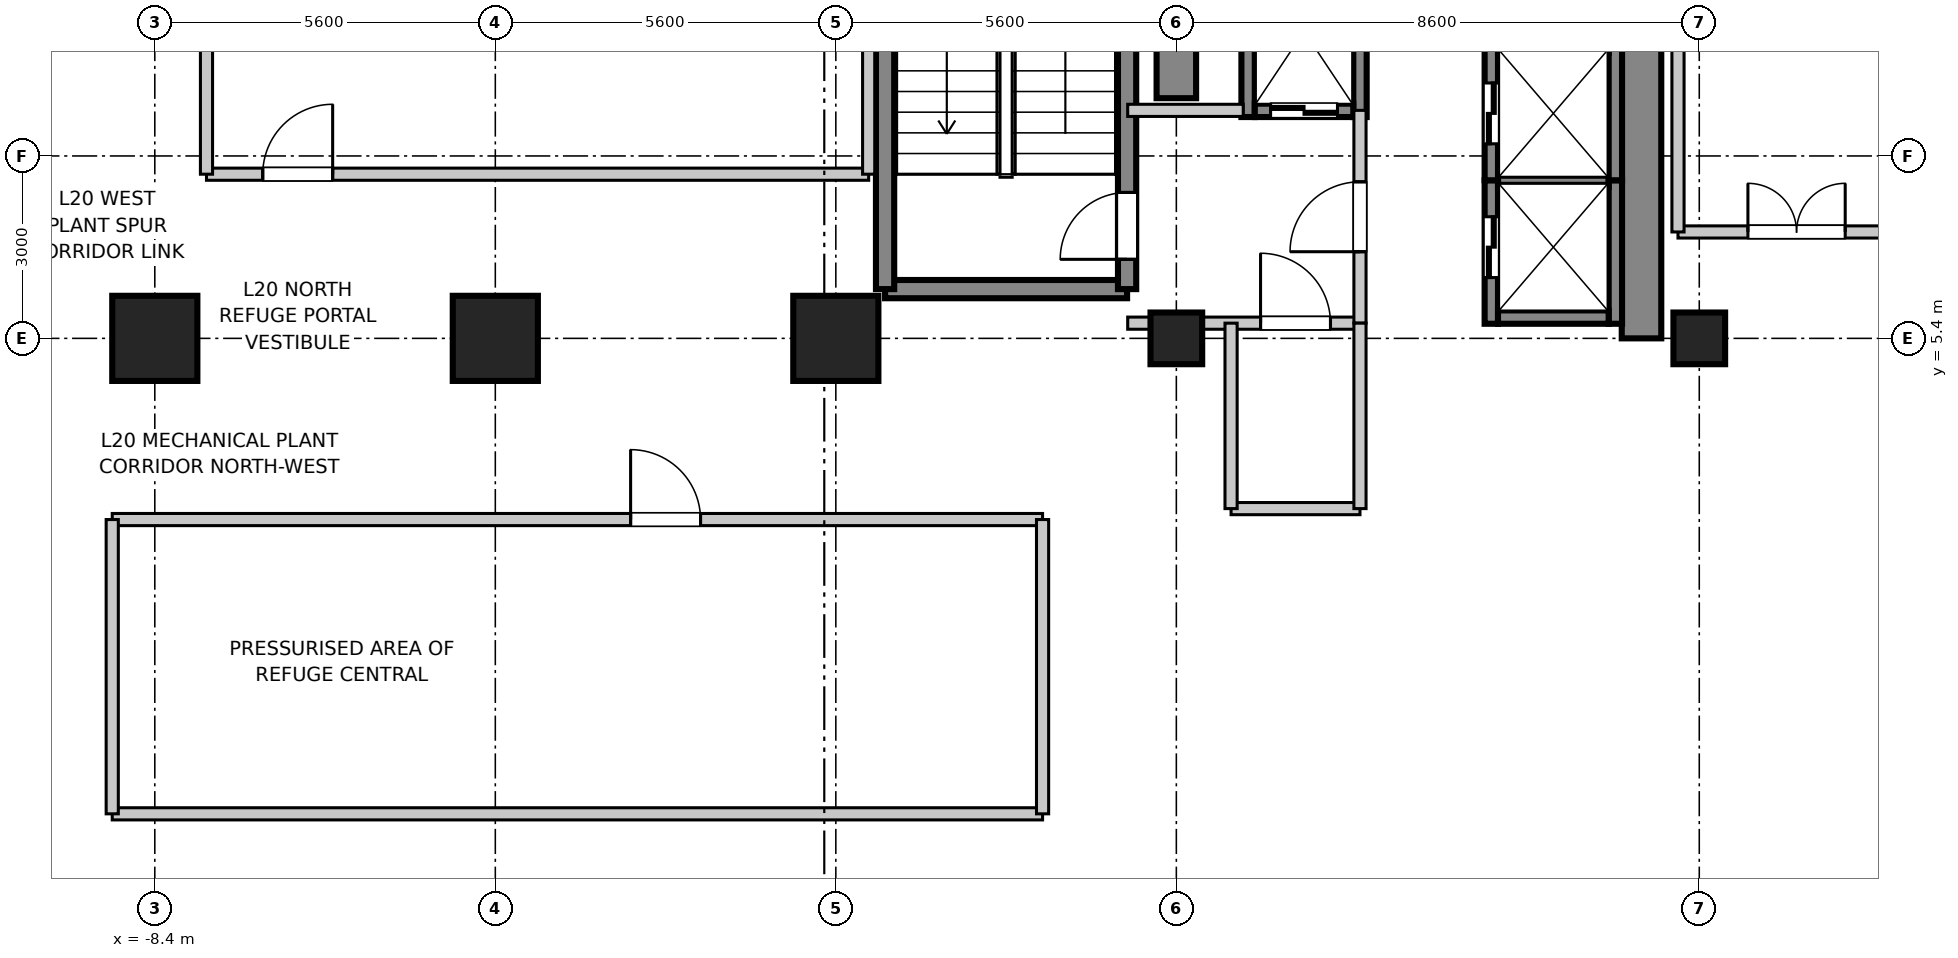
"""IFC4 building model, lengths in metres.
Left out: names, types, materials, properties, quantities, classifications, styles, units other than length and angle.
Written with IfcOpenShell. Run it as: python <this file> out.ifc"""

import sys

from ifc_helpers import new_model, si_unit, direction, frame, frame_2d, origin, origin_2d, place, context, subcontext, project, spatial, rectangle, extrude, source, transform, mapped, element, fill, save


model = new_model("IFC4")
c1 = context("Model", 3, precision=1e-05, world=origin(), true_north=direction((0.0, 1.0)))
c2 = subcontext(c1, "Body", "Model", "MODEL_VIEW")
j1 = project(units=[si_unit("LENGTHUNIT", "METRE"), si_unit("PLANEANGLEUNIT", "RADIAN")], contexts=[c1])
p1 = place(None, origin())
s1 = spatial("IfcSite", under=j1, at=p1, CompositionType="ELEMENT")
p2 = place(p1, origin())
s2 = spatial("IfcBuilding", under=s1, at=p2, CompositionType="ELEMENT")
p3 = place(p2, frame((0.0, 0.0, 83.5)))
s3 = spatial("IfcBuildingStorey", under=s2, at=p3, CompositionType="ELEMENT", Elevation=83.5)
m1 = source(origin(), c2, "Body", "SweptSolid", [
    extrude(rectangle(XDim=1.4, YDim=1.4, at=origin_2d()), origin(), (0.0, 0.0, 1.0), 4.755),
])
for number, where, z_axis, x_axis in (
    (1, (-8.4, 5.4, 0.0), (0.0, 0.0, 1.0), (1.0, 0.0, 0.0)),
    (2, (-2.8, 5.4, 0.0), (0.0, 0.0, 1.0), (1.0, 0.0, 0.0)),
    (3, (2.8, 5.4, 0.0), (0.0, 0.0, 1.0), (1.0, 0.0, 0.0)),
):
    element("IfcColumn", number, at=place(p3, frame(where, z_axis=z_axis, x_axis=x_axis)), inside=s3, PredefinedType="COLUMN", context=c2, shape_type="MappedRepresentation", body=[
        mapped(m1, transform((0.0, 0.0, 0.0), scale=1.0)),
    ])
m2 = source(origin(), c2, "Body", "SweptSolid", [
    extrude(rectangle(XDim=0.85, YDim=0.85, at=origin_2d()), origin(), (0.0, 0.0, 1.0), 4.755),
])
for number, where, z_axis, x_axis in (
    (4, (8.4, 5.4, 0.0), (0.0, 0.0, 1.0), (1.0, 0.0, 0.0)),
    (5, (17.0, 5.4, 0.0), (0.0, 0.0, 1.0), (1.0, 0.0, 0.0)),
):
    element("IfcColumn", number, at=place(p3, frame(where, z_axis=z_axis, x_axis=x_axis)), inside=s3, PredefinedType="PILASTER", context=c2, shape_type="MappedRepresentation", body=[
        mapped(m2, transform((0.0, 0.0, 0.0), scale=1.0)),
    ])
m3 = source(origin(), c2, "Body", "SweptSolid", [
    extrude(rectangle(XDim=7.65, YDim=0.65, at=frame_2d((3.825, 0.0))), origin(), (0.0, 0.0, 1.0), 4.53),
])
p4 = place(p3, frame((8.4, 9.35, 0.0), z_axis=(0.0, 0.0, 1.0), x_axis=(0.0, 1.0, 0.0)))
e6 = element("IfcWall", 6, at=p4, inside=s3, PredefinedType="SHEAR", context=c2, shape_type="MappedRepresentation", body=[
    mapped(m3, transform((0.0, 0.0, 0.0), scale=1.0)),
])
m4 = source(origin(), c2, "Body", "SweptSolid", [
    extrude(rectangle(XDim=11.6, YDim=0.65, at=frame_2d((5.8, 0.0))), origin(), (0.0, 0.0, 1.0), 4.53),
])
p5 = place(p3, frame((16.05, 5.4, 0.0), z_axis=(0.0, 0.0, 1.0), x_axis=(0.0, 1.0, 0.0)))
e7 = element("IfcWall", 7, at=p5, inside=s3, PredefinedType="SHEAR", context=c2, shape_type="MappedRepresentation", body=[
    mapped(m4, transform((0.0, 0.0, 0.0), scale=1.0)),
])
m5 = source(origin(), c2, "Body", "SweptSolid", [
    extrude(rectangle(XDim=3.98, YDim=0.3, at=frame_2d((1.99, 0.0))), origin(), (0.0, 0.0, 1.0), 4.53),
])
p6 = place(p3, frame((3.61, 6.21, 0.0), z_axis=(0.0, 0.0, 1.0), x_axis=(1.0, 0.0, 0.0)))
e8 = element("IfcWall", 8, at=p6, inside=s3, PredefinedType="SHEAR", context=c2, shape_type="MappedRepresentation", body=[
    mapped(m5, transform((0.0, 0.0, 0.0), scale=1.0)),
])
m6 = source(origin(), c2, "Body", "SweptSolid", [
    extrude(rectangle(XDim=9.38, YDim=0.3, at=frame_2d((4.69, 0.0))), origin(), (0.0, 0.0, 1.0), 4.53),
])
p7 = place(p3, frame((3.61, 6.21, 0.0), z_axis=(0.0, 0.0, 1.0), x_axis=(0.0, 1.0, 0.0)))
e9 = element("IfcWall", 9, at=p7, inside=s3, PredefinedType="SHEAR", context=c2, shape_type="MappedRepresentation", body=[
    mapped(m6, transform((0.0, 0.0, 0.0), scale=1.0)),
])
p8 = place(p3, frame((7.59, 6.21, 0.0), z_axis=(0.0, 0.0, 1.0), x_axis=(0.0, 1.0, 0.0)))
e10 = element("IfcWall", 10, at=p8, inside=s3, PredefinedType="SHEAR", context=c2, shape_type="MappedRepresentation", body=[
    mapped(m6, transform((0.0, 0.0, 0.0), scale=1.0)),
])
p9 = place(p8, frame((0.49, 0.0, 0.0)))
e11 = element("IfcOpeningElement", 11, at=p9, cuts=e10, PredefinedType="OPENING", context=c2, shape_type="SweptSolid", body=[
    extrude(rectangle(XDim=1.1, YDim=2.15, at=frame_2d((0.55, 1.075))), frame((0.0, 0.16, 0.0), z_axis=(0.0, -1.0, 0.0), x_axis=(1.0, 0.0, 0.0)), (0.0, 0.0, 1.0), 0.32),
])
m7 = source(origin(), c2, "Body", "SweptSolid", [
    extrude(rectangle(XDim=2.36, YDim=0.22, at=frame_2d((1.18, 0.0))), origin(), (0.0, 0.0, 1.0), 4.53),
])
p10 = place(p3, frame((13.58, 5.64, 0.0), z_axis=(0.0, 0.0, 1.0), x_axis=(0.0, 1.0, 0.0)))
e12 = element("IfcWall", 12, at=p10, inside=s3, PredefinedType="SHEAR", context=c2, shape_type="MappedRepresentation", body=[
    mapped(m7, transform((0.0, 0.0, 0.0), scale=1.0)),
])
p11 = place(p10, frame((0.76, 0.0, 0.0)))
e13 = element("IfcOpeningElement", 13, at=p11, cuts=e12, PredefinedType="OPENING", context=c2, shape_type="SweptSolid", body=[
    extrude(rectangle(XDim=1.0, YDim=2.2, at=frame_2d((0.5, 1.1))), frame((0.0, 0.12, 0.0), z_axis=(0.0, -1.0, 0.0), x_axis=(1.0, 0.0, 0.0)), (0.0, 0.0, 1.0), 0.24),
])
p12 = place(p3, frame((15.62, 5.64, 0.0), z_axis=(0.0, 0.0, 1.0), x_axis=(0.0, 1.0, 0.0)))
e14 = element("IfcWall", 14, at=p12, inside=s3, PredefinedType="SHEAR", context=c2, shape_type="MappedRepresentation", body=[
    mapped(m7, transform((0.0, 0.0, 0.0), scale=1.0)),
])
m8 = source(origin(), c2, "Body", "SweptSolid", [
    extrude(rectangle(XDim=1.82, YDim=0.22, at=frame_2d((0.91, 0.0))), origin(), (0.0, 0.0, 1.0), 4.53),
])
p13 = place(p3, frame((13.69, 5.75, 0.0), z_axis=(0.0, 0.0, 1.0), x_axis=(1.0, 0.0, 0.0)))
e15 = element("IfcWall", 15, at=p13, inside=s3, PredefinedType="SHEAR", context=c2, shape_type="MappedRepresentation", body=[
    mapped(m8, transform((0.0, 0.0, 0.0), scale=1.0)),
])
m9 = source(origin(), c2, "Body", "SweptSolid", [
    extrude(rectangle(XDim=1.82, YDim=0.22, at=frame_2d((0.91, 0.0))), origin(), (0.0, 0.0, 1.0), 4.8),
])
p14 = place(p3, frame((13.69, 8.0, 0.0), z_axis=(0.0, 0.0, 1.0), x_axis=(1.0, 0.0, 0.0)))
e16 = element("IfcWall", 16, at=p14, inside=s3, PredefinedType="SHEAR", context=c2, shape_type="MappedRepresentation", body=[
    mapped(m9, transform((0.0, 0.0, 0.0), scale=1.0)),
])
m10 = source(origin(), c2, "Body", "SweptSolid", [
    extrude(rectangle(XDim=2.2, YDim=0.22, at=frame_2d((1.1, 0.0))), origin(), (0.0, 0.0, 1.0), 4.53),
])
p15 = place(p3, frame((13.58, 8.0, 0.0), z_axis=(0.0, 0.0, 1.0), x_axis=(0.0, 1.0, 0.0)))
e17 = element("IfcWall", 17, at=p15, inside=s3, PredefinedType="SHEAR", context=c2, shape_type="MappedRepresentation", body=[
    mapped(m10, transform((0.0, 0.0, 0.0), scale=1.0)),
])
p16 = place(p15, frame((0.6, 0.0, 0.0)))
e18 = element("IfcOpeningElement", 18, at=p16, cuts=e17, PredefinedType="OPENING", context=c2, shape_type="SweptSolid", body=[
    extrude(rectangle(XDim=1.0, YDim=2.2, at=frame_2d((0.5, 1.1))), frame((0.0, 0.12, 0.0), z_axis=(0.0, -1.0, 0.0), x_axis=(1.0, 0.0, 0.0)), (0.0, 0.0, 1.0), 0.24),
])
p17 = place(p3, frame((15.62, 8.0, 0.0), z_axis=(0.0, 0.0, 1.0), x_axis=(0.0, 1.0, 0.0)))
e19 = element("IfcWall", 19, at=p17, inside=s3, PredefinedType="SHEAR", context=c2, shape_type="MappedRepresentation", body=[
    mapped(m10, transform((0.0, 0.0, 0.0), scale=1.0)),
])
p18 = place(p3, frame((13.69, 10.2, 0.0), z_axis=(0.0, 0.0, 1.0), x_axis=(1.0, 0.0, 0.0)))
e20 = element("IfcWall", 20, at=p18, inside=s3, PredefinedType="SHEAR", context=c2, shape_type="MappedRepresentation", body=[
    mapped(m9, transform((0.0, 0.0, 0.0), scale=1.0)),
])
m11 = source(origin(), c2, "Body", "SweptSolid", [
    extrude(rectangle(XDim=2.82, YDim=0.22, at=frame_2d((1.41, 0.0))), origin(), (0.0, 0.0, 1.0), 4.53),
])
for number, where, z_axis, x_axis in (
    (21, (9.58, 9.04, 0.0), (0.0, 0.0, 1.0), (0.0, 1.0, 0.0)),
    (22, (11.42, 9.04, 0.0), (0.0, 0.0, 1.0), (0.0, 1.0, 0.0)),
):
    element("IfcWall", number, at=place(p3, frame(where, z_axis=z_axis, x_axis=x_axis)), inside=s3, PredefinedType="SHEAR", context=c2, shape_type="MappedRepresentation", body=[
        mapped(m11, transform((0.0, 0.0, 0.0), scale=1.0)),
    ])
m12 = source(origin(), c2, "Body", "SweptSolid", [
    extrude(rectangle(XDim=1.62, YDim=0.22, at=frame_2d((0.81, 0.0))), origin(), (0.0, 0.0, 1.0), 4.53),
])
p19 = place(p3, frame((9.69, 9.15, 0.0), z_axis=(0.0, 0.0, 1.0), x_axis=(1.0, 0.0, 0.0)))
e23 = element("IfcWall", 23, at=p19, inside=s3, PredefinedType="SHEAR", context=c2, shape_type="MappedRepresentation", body=[
    mapped(m12, transform((0.0, 0.0, 0.0), scale=1.0)),
])
p20 = place(p19, frame((0.26, 0.0, 0.0)))
e24 = element("IfcOpeningElement", 24, at=p20, cuts=e23, PredefinedType="OPENING", context=c2, shape_type="SweptSolid", body=[
    extrude(rectangle(XDim=1.1, YDim=2.2, at=frame_2d((0.55, 1.1))), frame((0.0, 0.12, 0.0), z_axis=(0.0, -1.0, 0.0), x_axis=(1.0, 0.0, 0.0)), (0.0, 0.0, 1.0), 0.24),
])
m13 = source(origin(), c2, "Body", "SweptSolid", [
    extrude(rectangle(XDim=3.82, YDim=0.2, at=frame_2d((1.91, 0.0))), origin(), (0.0, 0.0, 1.0), 3.4),
])
p21 = place(p3, frame((7.6, 5.65, 0.0), z_axis=(0.0, 0.0, 1.0), x_axis=(1.0, 0.0, 0.0)))
e25 = element("IfcWall", 25, at=p21, inside=s3, PredefinedType="PARTITIONING", context=c2, shape_type="MappedRepresentation", body=[
    mapped(m13, transform((0.0, 0.0, 0.0), scale=1.0)),
])
p22 = place(p21, frame((2.185, 0.0, 0.0)))
e26 = element("IfcOpeningElement", 26, at=p22, cuts=e25, PredefinedType="OPENING", context=c2, shape_type="SweptSolid", body=[
    extrude(rectangle(XDim=1.15, YDim=2.15, at=frame_2d((0.575, 1.075))), frame((0.0, 0.11, 0.0), z_axis=(0.0, -1.0, 0.0), x_axis=(1.0, 0.0, 0.0)), (0.0, 0.0, 1.0), 0.22),
])
m14 = source(origin(), c2, "Body", "SweptSolid", [
    extrude(rectangle(XDim=1.9, YDim=0.2, at=frame_2d((0.95, 0.0))), origin(), (0.0, 0.0, 1.0), 3.4),
])
p23 = place(p3, frame((7.6, 9.15, 0.0), z_axis=(0.0, 0.0, 1.0), x_axis=(1.0, 0.0, 0.0)))
e27 = element("IfcWall", 27, at=p23, inside=s3, PredefinedType="PARTITIONING", context=c2, shape_type="MappedRepresentation", body=[
    mapped(m14, transform((0.0, 0.0, 0.0), scale=1.0)),
])
m15 = source(origin(), c2, "Body", "SweptSolid", [
    extrude(rectangle(XDim=3.5, YDim=0.2, at=frame_2d((1.75, 0.0))), origin(), (0.0, 0.0, 1.0), 3.4),
])
p24 = place(p3, frame((11.42, 5.65, 0.0), z_axis=(0.0, 0.0, 1.0), x_axis=(0.0, 1.0, 0.0)))
e28 = element("IfcWall", 28, at=p24, inside=s3, PredefinedType="PARTITIONING", context=c2, shape_type="MappedRepresentation", body=[
    mapped(m15, transform((0.0, 0.0, 0.0), scale=1.0)),
])
p25 = place(p24, frame((1.175, 0.0, 0.0)))
e29 = element("IfcOpeningElement", 29, at=p25, cuts=e28, PredefinedType="OPENING", context=c2, shape_type="SweptSolid", body=[
    extrude(rectangle(XDim=1.15, YDim=2.15, at=frame_2d((0.575, 1.075))), frame((0.0, 0.11, 0.0), z_axis=(0.0, -1.0, 0.0), x_axis=(1.0, 0.0, 0.0)), (0.0, 0.0, 1.0), 0.22),
])
m16 = source(origin(), c2, "Body", "SweptSolid", [
    extrude(rectangle(XDim=2.12, YDim=0.2, at=frame_2d((1.06, 0.0))), origin(), (0.0, 0.0, 1.0), 3.4),
])
p26 = place(p3, frame((9.3, 2.6, 0.0), z_axis=(0.0, 0.0, 1.0), x_axis=(1.0, 0.0, 0.0)))
e30 = element("IfcWall", 30, at=p26, inside=s3, PredefinedType="PARTITIONING", context=c2, shape_type="MappedRepresentation", body=[
    mapped(m16, transform((0.0, 0.0, 0.0), scale=1.0)),
])
m17 = source(origin(), c2, "Body", "SweptSolid", [
    extrude(rectangle(XDim=3.05, YDim=0.2, at=frame_2d((1.525, 0.0))), origin(), (0.0, 0.0, 1.0), 3.4),
])
for number, where, z_axis, x_axis in (
    (31, (9.3, 2.6, 0.0), (0.0, 0.0, 1.0), (0.0, 1.0, 0.0)),
    (32, (11.42, 2.6, 0.0), (0.0, 0.0, 1.0), (0.0, 1.0, 0.0)),
):
    element("IfcWall", number, at=place(p3, frame(where, z_axis=z_axis, x_axis=x_axis)), inside=s3, PredefinedType="PARTITIONING", context=c2, shape_type="MappedRepresentation", body=[
        mapped(m17, transform((0.0, 0.0, 0.0), scale=1.0)),
    ])
m18 = source(origin(), c2, "Body", "SweptSolid", [
    extrude(rectangle(XDim=10.89, YDim=0.2, at=frame_2d((5.445, 0.0))), origin(), (0.0, 0.0, 1.0), 3.4),
])
p27 = place(p3, frame((-7.55, 8.1, 0.0), z_axis=(0.0, 0.0, 1.0), x_axis=(1.0, 0.0, 0.0)))
e33 = element("IfcWall", 33, at=p27, inside=s3, PredefinedType="PARTITIONING", context=c2, shape_type="MappedRepresentation", body=[
    mapped(m18, transform((0.0, 0.0, 0.0), scale=1.0)),
])
p28 = place(p27, frame((0.925, 0.0, 0.0)))
e34 = element("IfcOpeningElement", 34, at=p28, cuts=e33, PredefinedType="OPENING", context=c2, shape_type="SweptSolid", body=[
    extrude(rectangle(XDim=1.15, YDim=2.15, at=frame_2d((0.575, 1.075))), frame((0.0, 0.11, 0.0), z_axis=(0.0, -1.0, 0.0), x_axis=(1.0, 0.0, 0.0)), (0.0, 0.0, 1.0), 0.22),
])
m19 = source(origin(), c2, "Body", "SweptSolid", [
    extrude(rectangle(XDim=8.15, YDim=0.2, at=frame_2d((4.075, 0.0))), origin(), (0.0, 0.0, 1.0), 3.4),
])
for number, where, z_axis, x_axis in (
    (35, (-7.55, 8.1, 0.0), (0.0, 0.0, 1.0), (0.0, 1.0, 0.0)),
    (36, (3.34, 8.1, 0.0), (0.0, 0.0, 1.0), (0.0, 1.0, 0.0)),
):
    element("IfcWall", number, at=place(p3, frame(where, z_axis=z_axis, x_axis=x_axis)), inside=s3, PredefinedType="PARTITIONING", context=c2, shape_type="MappedRepresentation", body=[
        mapped(m19, transform((0.0, 0.0, 0.0), scale=1.0)),
    ])
m20 = source(origin(), c2, "Body", "SweptSolid", [
    extrude(rectangle(XDim=15.3, YDim=0.2, at=frame_2d((7.65, 0.0))), origin(), (0.0, 0.0, 1.0), 3.4),
])
p29 = place(p3, frame((-9.1, -2.42, 0.0), z_axis=(0.0, 0.0, 1.0), x_axis=(1.0, 0.0, 0.0)))
e37 = element("IfcWall", 37, at=p29, inside=s3, PredefinedType="PARTITIONING", context=c2, shape_type="MappedRepresentation", body=[
    mapped(m20, transform((0.0, 0.0, 0.0), scale=1.0)),
])
p30 = place(p3, frame((-9.1, 2.42, 0.0), z_axis=(0.0, 0.0, 1.0), x_axis=(1.0, 0.0, 0.0)))
e38 = element("IfcWall", 38, at=p30, inside=s3, PredefinedType="PARTITIONING", context=c2, shape_type="MappedRepresentation", body=[
    mapped(m20, transform((0.0, 0.0, 0.0), scale=1.0)),
])
p31 = place(p30, frame((8.525, 0.0, 0.0)))
e39 = element("IfcOpeningElement", 39, at=p31, cuts=e38, PredefinedType="OPENING", context=c2, shape_type="SweptSolid", body=[
    extrude(rectangle(XDim=1.15, YDim=2.15, at=frame_2d((0.575, 1.075))), frame((0.0, 0.11, 0.0), z_axis=(0.0, -1.0, 0.0), x_axis=(1.0, 0.0, 0.0)), (0.0, 0.0, 1.0), 0.22),
])
m21 = source(origin(), c2, "Body", "SweptSolid", [
    extrude(rectangle(XDim=4.84, YDim=0.2, at=frame_2d((2.42, 0.0))), origin(), (0.0, 0.0, 1.0), 3.4),
])
for number, where, z_axis, x_axis in (
    (40, (-9.1, -2.42, 0.0), (0.0, 0.0, 1.0), (0.0, 1.0, 0.0)),
    (41, (6.2, -2.42, 0.0), (0.0, 0.0, 1.0), (0.0, 1.0, 0.0)),
):
    element("IfcWall", number, at=place(p3, frame(where, z_axis=z_axis, x_axis=x_axis)), inside=s3, PredefinedType="PARTITIONING", context=c2, shape_type="MappedRepresentation", body=[
        mapped(m21, transform((0.0, 0.0, 0.0), scale=1.0)),
    ])
m22 = source(origin(), c2, "Body", "SweptSolid", [
    extrude(rectangle(XDim=7.47, YDim=0.2, at=frame_2d((3.735, 0.0))), origin(), (0.0, 0.0, 1.0), 3.4),
])
p32 = place(p3, frame((16.65, 7.15, 0.0), z_axis=(0.0, 0.0, 1.0), x_axis=(1.0, 0.0, 0.0)))
e42 = element("IfcWall", 42, at=p32, inside=s3, PredefinedType="PARTITIONING", context=c2, shape_type="MappedRepresentation", body=[
    mapped(m22, transform((0.0, 0.0, 0.0), scale=1.0)),
])
p33 = place(p32, frame((1.15, 0.0, 0.0)))
e43 = element("IfcOpeningElement", 43, at=p33, cuts=e42, PredefinedType="OPENING", context=c2, shape_type="SweptSolid", body=[
    extrude(rectangle(XDim=1.6, YDim=2.15, at=frame_2d((0.8, 1.075))), frame((0.0, 0.11, 0.0), z_axis=(0.0, -1.0, 0.0), x_axis=(1.0, 0.0, 0.0)), (0.0, 0.0, 1.0), 0.22),
])
m23 = source(origin(), c2, "Body", "SweptSolid", [
    extrude(rectangle(XDim=8.9, YDim=0.2, at=frame_2d((4.45, 0.0))), origin(), (0.0, 0.0, 1.0), 3.4),
])
p34 = place(p3, frame((16.65, 7.15, 0.0), z_axis=(0.0, 0.0, 1.0), x_axis=(0.0, 1.0, 0.0)))
e44 = element("IfcWall", 44, at=p34, inside=s3, PredefinedType="PARTITIONING", context=c2, shape_type="MappedRepresentation", body=[
    mapped(m23, transform((0.0, 0.0, 0.0), scale=1.0)),
])
m24 = source(origin(), c2, "Body", "SweptSolid", [
    extrude(rectangle(XDim=1.1, YDim=2.15, at=frame_2d((0.55, 1.075))), frame((0.0, 0.025, 0.0), z_axis=(0.0, -1.0, 0.0), x_axis=(1.0, 0.0, 0.0)), (0.0, 0.0, 1.0), 0.05),
])
p35 = place(p9, origin())
e45 = element("IfcDoor", 45, at=p35, inside=s3, OperationType="SINGLE_SWING_LEFT", PredefinedType="DOOR", context=c2, shape_type="MappedRepresentation", body=[
    mapped(m24, transform((0.0, 0.0, 0.0), scale=1.0)),
])
fill(e11, e45)
m25 = source(origin(), c2, "Body", "SweptSolid", [
    extrude(rectangle(XDim=1.0, YDim=2.2, at=frame_2d((0.5, 1.1))), frame((0.0, 0.025, 0.0), z_axis=(0.0, -1.0, 0.0), x_axis=(1.0, 0.0, 0.0)), (0.0, 0.0, 1.0), 0.05),
])
p36 = place(p11, origin())
e46 = element("IfcDoor", 46, at=p36, inside=s3, OperationType="DOUBLE_DOOR_SLIDING", PredefinedType="DOOR", context=c2, shape_type="MappedRepresentation", body=[
    mapped(m25, transform((0.0, 0.0, 0.0), scale=1.0)),
])
fill(e13, e46)
p37 = place(p16, origin())
e47 = element("IfcDoor", 47, at=p37, inside=s3, OperationType="DOUBLE_DOOR_SLIDING", PredefinedType="DOOR", context=c2, shape_type="MappedRepresentation", body=[
    mapped(m25, transform((0.0, 0.0, 0.0), scale=1.0)),
])
fill(e18, e47)
m26 = source(origin(), c2, "Body", "SweptSolid", [
    extrude(rectangle(XDim=1.1, YDim=2.2, at=frame_2d((0.55, 1.1))), frame((0.0, 0.025, 0.0), z_axis=(0.0, -1.0, 0.0), x_axis=(1.0, 0.0, 0.0)), (0.0, 0.0, 1.0), 0.05),
])
p38 = place(p20, frame((1.1, 0.0, 0.0), z_axis=(0.0, 0.0, 1.0), x_axis=(-1.0, 0.0, 0.0)))
e48 = element("IfcDoor", 48, at=p38, inside=s3, OperationType="DOUBLE_DOOR_SLIDING", PredefinedType="DOOR", context=c2, shape_type="MappedRepresentation", body=[
    mapped(m26, transform((0.0, 0.0, 0.0), scale=1.0)),
])
fill(e24, e48)
m27 = source(origin(), c2, "Body", "SweptSolid", [
    extrude(rectangle(XDim=1.15, YDim=2.15, at=frame_2d((0.575, 1.075))), frame((0.0, 0.025, 0.0), z_axis=(0.0, -1.0, 0.0), x_axis=(1.0, 0.0, 0.0)), (0.0, 0.0, 1.0), 0.05),
])
p39 = place(p25, frame((1.15, 0.0, 0.0), z_axis=(0.0, 0.0, 1.0), x_axis=(-1.0, 0.0, 0.0)))
e49 = element("IfcDoor", 49, at=p39, inside=s3, OperationType="SINGLE_SWING_LEFT", PredefinedType="DOOR", context=c2, shape_type="MappedRepresentation", body=[
    mapped(m27, transform((0.0, 0.0, 0.0), scale=1.0)),
])
fill(e29, e49)
p40 = place(p22, frame((1.15, 0.0, 0.0), z_axis=(0.0, 0.0, 1.0), x_axis=(-1.0, 0.0, 0.0)))
e50 = element("IfcDoor", 50, at=p40, inside=s3, OperationType="SINGLE_SWING_LEFT", PredefinedType="DOOR", context=c2, shape_type="MappedRepresentation", body=[
    mapped(m27, transform((0.0, 0.0, 0.0), scale=1.0)),
])
fill(e26, e50)
p41 = place(p28, origin())
e51 = element("IfcDoor", 51, at=p41, inside=s3, OperationType="SINGLE_SWING_RIGHT", PredefinedType="DOOR", context=c2, shape_type="MappedRepresentation", body=[
    mapped(m27, transform((0.0, 0.0, 0.0), scale=1.0)),
])
fill(e34, e51)
p42 = place(p31, frame((1.15, 0.0, 0.0), z_axis=(0.0, 0.0, 1.0), x_axis=(-1.0, 0.0, 0.0)))
e52 = element("IfcDoor", 52, at=p42, inside=s3, OperationType="SINGLE_SWING_LEFT", PredefinedType="DOOR", context=c2, shape_type="MappedRepresentation", body=[
    mapped(m27, transform((0.0, 0.0, 0.0), scale=1.0)),
])
fill(e39, e52)
m28 = source(origin(), c2, "Body", "SweptSolid", [
    extrude(rectangle(XDim=1.6, YDim=2.15, at=frame_2d((0.8, 1.075))), frame((0.0, 0.025, 0.0), z_axis=(0.0, -1.0, 0.0), x_axis=(1.0, 0.0, 0.0)), (0.0, 0.0, 1.0), 0.05),
])
p43 = place(p33, origin())
e53 = element("IfcDoor", 53, at=p43, inside=s3, OperationType="DOUBLE_DOOR_SINGLE_SWING", PredefinedType="DOOR", context=c2, shape_type="MappedRepresentation", body=[
    mapped(m28, transform((0.0, 0.0, 0.0), scale=1.0)),
])
fill(e43, e53)
save(model, sys.argv[1])
